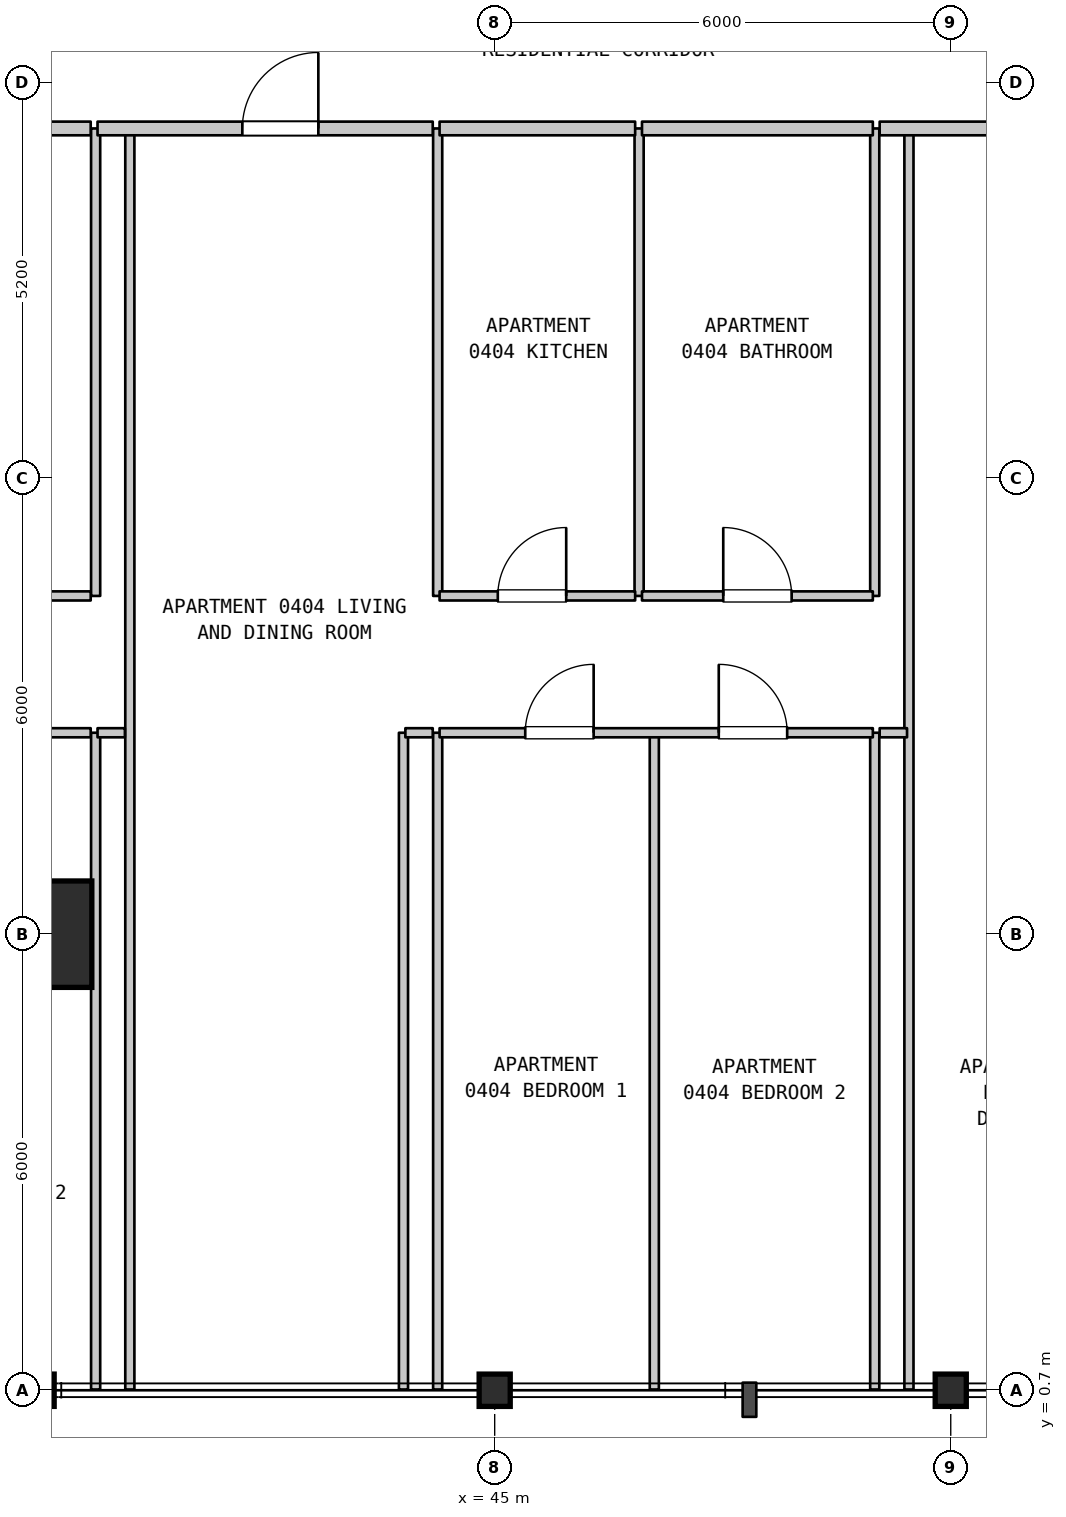
"""IFC4 building model, lengths in metres.
Left out: names, types, materials, properties, quantities, classifications, styles, units other than length and angle.
Written with IfcOpenShell. Run it as: python <this file> out.ifc"""

import sys

from ifc_helpers import new_model, si_unit, direction, frame, frame_2d, origin, origin_2d, place, context, subcontext, project, spatial, rectangle, i_section, extrude, element, fill, save


model = new_model("IFC4")
c1 = context("Model", 3, precision=1e-05, world=origin(), true_north=direction((0.0, 1.0)))
c2 = subcontext(c1, "Body", "Model", "MODEL_VIEW")
j1 = project(units=[si_unit("LENGTHUNIT", "METRE"), si_unit("PLANEANGLEUNIT", "RADIAN")], contexts=[c1])
p1 = place(None, origin())
s1 = spatial("IfcSite", under=j1, at=p1, CompositionType="ELEMENT")
p2 = place(p1, origin())
s2 = spatial("IfcBuilding", under=s1, at=p2, CompositionType="ELEMENT")
p3 = place(p2, frame((0.0, 0.0, 24.0)))
s3 = spatial("IfcBuildingStorey", under=s2, at=p3, CompositionType="ELEMENT", Elevation=24.0)
p4 = place(p3, frame((39.0, 0.7, 0.0), z_axis=(0.0, 0.0, 1.0), x_axis=(1.0, 0.0, 0.0)))
e1 = element("IfcColumn", 1, at=p4, inside=s3, PredefinedType="COLUMN", context=c2, shape_type="SweptSolid", body=[
    extrude(i_section(OverallWidth=0.409, OverallDepth=0.425, WebThickness=0.032, FlangeThickness=0.052, FilletRadius=0.015, at=origin_2d()), origin(), (0.0, 0.0, 1.0), 3.7),
])
p5 = place(p3, frame((39.0, 6.7, 0.0), z_axis=(0.0, 0.0, 1.0), x_axis=(1.0, 0.0, 0.0)))
e2 = element("IfcColumn", 2, at=p5, inside=s3, PredefinedType="COLUMN", context=c2, shape_type="SweptSolid", body=[
    extrude(rectangle(XDim=1.4, YDim=1.4, at=origin_2d()), origin(), (0.0, 0.0, 1.0), 3.7),
])
for number, where, z_axis, x_axis in (
    (3, (45.0, 0.7, 0.0), (0.0, 0.0, 1.0), (1.0, 0.0, 0.0)),
    (4, (51.0, 0.7, 0.0), (0.0, 0.0, 1.0), (1.0, 0.0, 0.0)),
):
    element("IfcColumn", number, at=place(p3, frame(where, z_axis=z_axis, x_axis=x_axis)), inside=s3, PredefinedType="COLUMN", context=c2, shape_type="SweptSolid", body=[
        extrude(i_section(OverallWidth=0.409, OverallDepth=0.425, WebThickness=0.032, FlangeThickness=0.052, FilletRadius=0.015, at=origin_2d()), origin(), (0.0, 0.0, 1.0), 3.7),
    ])
p6 = place(p3, frame((39.75, 0.71, 0.0), z_axis=(0.0, 0.0, 1.0), x_axis=(0.0, 1.0, 0.0)))
e5 = element("IfcWall", 5, at=p6, inside=s3, PredefinedType="PARTITIONING", context=c2, shape_type="SweptSolid", body=[
    extrude(rectangle(XDim=8.64, YDim=0.12, at=frame_2d((4.32, 0.0))), origin(), (0.0, 0.0, 1.0), 3.385),
])
p7 = place(p3, frame((39.75, 11.15, 0.0), z_axis=(0.0, 0.0, 1.0), x_axis=(0.0, 1.0, 0.0)))
e6 = element("IfcWall", 6, at=p7, inside=s3, PredefinedType="PARTITIONING", context=c2, shape_type="SweptSolid", body=[
    extrude(rectangle(XDim=6.15, YDim=0.12, at=frame_2d((3.075, 0.0))), origin(), (0.0, 0.0, 1.0), 3.385),
])
p8 = place(p3, frame((40.2, 0.71, 0.0), z_axis=(0.0, 0.0, 1.0), x_axis=(0.0, 1.0, 0.0)))
e7 = element("IfcWall", 7, at=p8, inside=s3, PredefinedType="PARTITIONING", context=c2, shape_type="SweptSolid", body=[
    extrude(rectangle(XDim=16.59, YDim=0.12, at=frame_2d((8.295, 0.0))), origin(), (0.0, 0.0, 1.0), 3.385),
])
for number, where, z_axis, x_axis in (
    (8, (43.8, 0.71, 0.0), (0.0, 0.0, 1.0), (0.0, 1.0, 0.0)),
    (9, (44.25, 0.71, 0.0), (0.0, 0.0, 1.0), (0.0, 1.0, 0.0)),
):
    element("IfcWall", number, at=place(p3, frame(where, z_axis=z_axis, x_axis=x_axis)), inside=s3, PredefinedType="PARTITIONING", context=c2, shape_type="SweptSolid", body=[
        extrude(rectangle(XDim=8.64, YDim=0.12, at=frame_2d((4.32, 0.0))), origin(), (0.0, 0.0, 1.0), 3.385),
    ])
for number, where, z_axis, x_axis in (
    (10, (44.25, 11.15, 0.0), (0.0, 0.0, 1.0), (0.0, 1.0, 0.0)),
    (11, (46.9, 11.15, 0.0), (0.0, 0.0, 1.0), (0.0, 1.0, 0.0)),
):
    element("IfcWall", number, at=place(p3, frame(where, z_axis=z_axis, x_axis=x_axis)), inside=s3, PredefinedType="PARTITIONING", context=c2, shape_type="SweptSolid", body=[
        extrude(rectangle(XDim=6.15, YDim=0.12, at=frame_2d((3.075, 0.0))), origin(), (0.0, 0.0, 1.0), 3.385),
    ])
for number, where, z_axis, x_axis in (
    (12, (47.1, 0.71, 0.0), (0.0, 0.0, 1.0), (0.0, 1.0, 0.0)),
    (13, (50.0, 0.71, 0.0), (0.0, 0.0, 1.0), (0.0, 1.0, 0.0)),
):
    element("IfcWall", number, at=place(p3, frame(where, z_axis=z_axis, x_axis=x_axis)), inside=s3, PredefinedType="PARTITIONING", context=c2, shape_type="SweptSolid", body=[
        extrude(rectangle(XDim=8.64, YDim=0.12, at=frame_2d((4.32, 0.0))), origin(), (0.0, 0.0, 1.0), 3.385),
    ])
p9 = place(p3, frame((50.0, 11.15, 0.0), z_axis=(0.0, 0.0, 1.0), x_axis=(0.0, 1.0, 0.0)))
e14 = element("IfcWall", 14, at=p9, inside=s3, PredefinedType="PARTITIONING", context=c2, shape_type="SweptSolid", body=[
    extrude(rectangle(XDim=6.15, YDim=0.12, at=frame_2d((3.075, 0.0))), origin(), (0.0, 0.0, 1.0), 3.385),
])
p10 = place(p3, frame((50.45, 0.71, 0.0), z_axis=(0.0, 0.0, 1.0), x_axis=(0.0, 1.0, 0.0)))
e15 = element("IfcWall", 15, at=p10, inside=s3, PredefinedType="PARTITIONING", context=c2, shape_type="SweptSolid", body=[
    extrude(rectangle(XDim=16.59, YDim=0.12, at=frame_2d((8.295, 0.0))), origin(), (0.0, 0.0, 1.0), 3.385),
])
p11 = place(p3, frame((33.985, 9.35, 0.0), z_axis=(0.0, 0.0, 1.0), x_axis=(1.0, 0.0, 0.0)))
e16 = element("IfcWall", 16, at=p11, inside=s3, PredefinedType="PARTITIONING", context=c2, shape_type="SweptSolid", body=[
    extrude(rectangle(XDim=5.7, YDim=0.12, at=frame_2d((2.85, 0.0))), origin(), (0.0, 0.0, 1.0), 3.385),
])
p12 = place(p11, frame((1.127, 0.0, 0.0)))
e17 = element("IfcOpeningElement", 17, at=p12, cuts=e16, PredefinedType="OPENING", context=c2, shape_type="SweptSolid", body=[
    extrude(rectangle(XDim=0.9, YDim=2.15, at=frame_2d((0.45, 1.075))), frame((0.0, 0.07, 0.0), z_axis=(0.0, -1.0, 0.0), x_axis=(1.0, 0.0, 0.0)), (0.0, 0.0, 1.0), 0.14),
])
p13 = place(p11, frame((3.673, 0.0, 0.0)))
e18 = element("IfcOpeningElement", 18, at=p13, cuts=e16, PredefinedType="OPENING", context=c2, shape_type="SweptSolid", body=[
    extrude(rectangle(XDim=0.9, YDim=2.15, at=frame_2d((0.45, 1.075))), frame((0.0, 0.07, 0.0), z_axis=(0.0, -1.0, 0.0), x_axis=(1.0, 0.0, 0.0)), (0.0, 0.0, 1.0), 0.14),
])
for number, where, z_axis, x_axis in (
    (19, (39.775, 9.35, 0.0), (0.0, 0.0, 1.0), (1.0, 0.0, 0.0)),
    (20, (43.825, 9.35, 0.0), (0.0, 0.0, 1.0), (1.0, 0.0, 0.0)),
):
    element("IfcWall", number, at=place(p3, frame(where, z_axis=z_axis, x_axis=x_axis)), inside=s3, PredefinedType="PARTITIONING", context=c2, shape_type="SweptSolid", body=[
        extrude(rectangle(XDim=0.36, YDim=0.12, at=frame_2d((0.18, 0.0))), origin(), (0.0, 0.0, 1.0), 3.385),
    ])
p14 = place(p3, frame((44.275, 9.35, 0.0), z_axis=(0.0, 0.0, 1.0), x_axis=(1.0, 0.0, 0.0)))
e21 = element("IfcWall", 21, at=p14, inside=s3, PredefinedType="PARTITIONING", context=c2, shape_type="SweptSolid", body=[
    extrude(rectangle(XDim=5.7, YDim=0.12, at=frame_2d((2.85, 0.0))), origin(), (0.0, 0.0, 1.0), 3.385),
])
p15 = place(p14, frame((1.127, 0.0, 0.0)))
e22 = element("IfcOpeningElement", 22, at=p15, cuts=e21, PredefinedType="OPENING", context=c2, shape_type="SweptSolid", body=[
    extrude(rectangle(XDim=0.9, YDim=2.15, at=frame_2d((0.45, 1.075))), frame((0.0, 0.07, 0.0), z_axis=(0.0, -1.0, 0.0), x_axis=(1.0, 0.0, 0.0)), (0.0, 0.0, 1.0), 0.14),
])
p16 = place(p14, frame((3.673, 0.0, 0.0)))
e23 = element("IfcOpeningElement", 23, at=p16, cuts=e21, PredefinedType="OPENING", context=c2, shape_type="SweptSolid", body=[
    extrude(rectangle(XDim=0.9, YDim=2.15, at=frame_2d((0.45, 1.075))), frame((0.0, 0.07, 0.0), z_axis=(0.0, -1.0, 0.0), x_axis=(1.0, 0.0, 0.0)), (0.0, 0.0, 1.0), 0.14),
])
p17 = place(p3, frame((50.065, 9.35, 0.0), z_axis=(0.0, 0.0, 1.0), x_axis=(1.0, 0.0, 0.0)))
e24 = element("IfcWall", 24, at=p17, inside=s3, PredefinedType="PARTITIONING", context=c2, shape_type="SweptSolid", body=[
    extrude(rectangle(XDim=0.36, YDim=0.12, at=frame_2d((0.18, 0.0))), origin(), (0.0, 0.0, 1.0), 3.385),
])
p18 = place(p3, frame((36.648, 11.15, 0.0), z_axis=(0.0, 0.0, 1.0), x_axis=(1.0, 0.0, 0.0)))
e25 = element("IfcWall", 25, at=p18, inside=s3, PredefinedType="PARTITIONING", context=c2, shape_type="SweptSolid", body=[
    extrude(rectangle(XDim=3.037, YDim=0.12, at=frame_2d((1.519, 0.0))), origin(), (0.0, 0.0, 1.0), 3.385),
])
p19 = place(p18, frame((1.068, 0.0, 0.0)))
e26 = element("IfcOpeningElement", 26, at=p19, cuts=e25, PredefinedType="OPENING", context=c2, shape_type="SweptSolid", body=[
    extrude(rectangle(XDim=0.9, YDim=2.1, at=frame_2d((0.45, 1.05))), frame((0.0, 0.07, 0.0), z_axis=(0.0, -1.0, 0.0), x_axis=(1.0, 0.0, 0.0)), (0.0, 0.0, 1.0), 0.14),
])
p20 = place(p3, frame((44.275, 11.15, 0.0), z_axis=(0.0, 0.0, 1.0), x_axis=(1.0, 0.0, 0.0)))
e27 = element("IfcWall", 27, at=p20, inside=s3, PredefinedType="PARTITIONING", context=c2, shape_type="SweptSolid", body=[
    extrude(rectangle(XDim=2.573, YDim=0.12, at=frame_2d((1.287, 0.0))), origin(), (0.0, 0.0, 1.0), 3.385),
])
p21 = place(p20, frame((0.766, 0.0, 0.0)))
e28 = element("IfcOpeningElement", 28, at=p21, cuts=e27, PredefinedType="OPENING", context=c2, shape_type="SweptSolid", body=[
    extrude(rectangle(XDim=0.9, YDim=2.15, at=frame_2d((0.45, 1.075))), frame((0.0, 0.07, 0.0), z_axis=(0.0, -1.0, 0.0), x_axis=(1.0, 0.0, 0.0)), (0.0, 0.0, 1.0), 0.14),
])
p22 = place(p3, frame((46.938, 11.15, 0.0), z_axis=(0.0, 0.0, 1.0), x_axis=(1.0, 0.0, 0.0)))
e29 = element("IfcWall", 29, at=p22, inside=s3, PredefinedType="PARTITIONING", context=c2, shape_type="SweptSolid", body=[
    extrude(rectangle(XDim=3.037, YDim=0.12, at=frame_2d((1.519, 0.0))), origin(), (0.0, 0.0, 1.0), 3.385),
])
p23 = place(p22, frame((1.069, 0.0, 0.0)))
e30 = element("IfcOpeningElement", 30, at=p23, cuts=e29, PredefinedType="OPENING", context=c2, shape_type="SweptSolid", body=[
    extrude(rectangle(XDim=0.9, YDim=2.1, at=frame_2d((0.45, 1.05))), frame((0.0, 0.07, 0.0), z_axis=(0.0, -1.0, 0.0), x_axis=(1.0, 0.0, 0.0)), (0.0, 0.0, 1.0), 0.14),
])
p24 = place(p3, frame((36.648, 17.3, 0.0), z_axis=(0.0, 0.0, 1.0), x_axis=(1.0, 0.0, 0.0)))
e31 = element("IfcWall", 31, at=p24, inside=s3, PredefinedType="STANDARD", context=c2, shape_type="SweptSolid", body=[
    extrude(rectangle(XDim=3.037, YDim=0.18, at=frame_2d((1.519, 0.0))), origin(), (0.0, 0.0, 1.0), 3.385),
])
p25 = place(p3, frame((39.775, 17.3, 0.0), z_axis=(0.0, 0.0, 1.0), x_axis=(1.0, 0.0, 0.0)))
e32 = element("IfcWall", 32, at=p25, inside=s3, PredefinedType="STANDARD", context=c2, shape_type="SweptSolid", body=[
    extrude(rectangle(XDim=4.41, YDim=0.18, at=frame_2d((2.205, 0.0))), origin(), (0.0, 0.0, 1.0), 3.385),
])
p26 = place(p25, frame((1.905, 0.0, 0.0)))
e33 = element("IfcOpeningElement", 33, at=p26, cuts=e32, PredefinedType="OPENING", context=c2, shape_type="SweptSolid", body=[
    extrude(rectangle(XDim=1.0, YDim=2.15, at=frame_2d((0.5, 1.075))), frame((0.0, 0.1, 0.0), z_axis=(0.0, -1.0, 0.0), x_axis=(1.0, 0.0, 0.0)), (0.0, 0.0, 1.0), 0.2),
])
p27 = place(p3, frame((44.275, 17.3, 0.0), z_axis=(0.0, 0.0, 1.0), x_axis=(1.0, 0.0, 0.0)))
e34 = element("IfcWall", 34, at=p27, inside=s3, PredefinedType="STANDARD", context=c2, shape_type="SweptSolid", body=[
    extrude(rectangle(XDim=2.573, YDim=0.18, at=frame_2d((1.287, 0.0))), origin(), (0.0, 0.0, 1.0), 3.385),
])
p28 = place(p3, frame((46.938, 17.3, 0.0), z_axis=(0.0, 0.0, 1.0), x_axis=(1.0, 0.0, 0.0)))
e35 = element("IfcWall", 35, at=p28, inside=s3, PredefinedType="STANDARD", context=c2, shape_type="SweptSolid", body=[
    extrude(rectangle(XDim=3.037, YDim=0.18, at=frame_2d((1.519, 0.0))), origin(), (0.0, 0.0, 1.0), 3.385),
])
p29 = place(p3, frame((50.065, 17.3, 0.0), z_axis=(0.0, 0.0, 1.0), x_axis=(1.0, 0.0, 0.0)))
e36 = element("IfcWall", 36, at=p29, inside=s3, PredefinedType="STANDARD", context=c2, shape_type="SweptSolid", body=[
    extrude(rectangle(XDim=3.96, YDim=0.18, at=frame_2d((1.98, 0.0))), origin(), (0.0, 0.0, 1.0), 3.385),
])
p30 = place(p29, frame((1.609, 0.0, 0.0)))
e37 = element("IfcOpeningElement", 37, at=p30, cuts=e36, PredefinedType="OPENING", context=c2, shape_type="SweptSolid", body=[
    extrude(rectangle(XDim=1.0, YDim=2.15, at=frame_2d((0.5, 1.075))), frame((0.0, 0.1, 0.0), z_axis=(0.0, -1.0, 0.0), x_axis=(1.0, 0.0, 0.0)), (0.0, 0.0, 1.0), 0.2),
])
p31 = place(p15, origin())
e38 = element("IfcDoor", 38, at=p31, inside=s3, OperationType="SINGLE_SWING_RIGHT", PredefinedType="DOOR", context=c2, shape_type="SweptSolid", body=[
    extrude(rectangle(XDim=0.9, YDim=2.15, at=frame_2d((0.45, 1.075))), frame((0.0, 0.025, 0.0), z_axis=(0.0, -1.0, 0.0), x_axis=(1.0, 0.0, 0.0)), (0.0, 0.0, 1.0), 0.05),
])
fill(e22, e38)
p32 = place(p16, origin())
e39 = element("IfcDoor", 39, at=p32, inside=s3, OperationType="SINGLE_SWING_LEFT", PredefinedType="DOOR", context=c2, shape_type="SweptSolid", body=[
    extrude(rectangle(XDim=0.9, YDim=2.15, at=frame_2d((0.45, 1.075))), frame((0.0, 0.025, 0.0), z_axis=(0.0, -1.0, 0.0), x_axis=(1.0, 0.0, 0.0)), (0.0, 0.0, 1.0), 0.05),
])
fill(e23, e39)
p33 = place(p21, origin())
e40 = element("IfcDoor", 40, at=p33, inside=s3, OperationType="SINGLE_SWING_RIGHT", PredefinedType="DOOR", context=c2, shape_type="SweptSolid", body=[
    extrude(rectangle(XDim=0.9, YDim=2.15, at=frame_2d((0.45, 1.075))), frame((0.0, 0.025, 0.0), z_axis=(0.0, -1.0, 0.0), x_axis=(1.0, 0.0, 0.0)), (0.0, 0.0, 1.0), 0.05),
])
fill(e28, e40)
p34 = place(p23, origin())
e41 = element("IfcDoor", 41, at=p34, inside=s3, OperationType="SINGLE_SWING_LEFT", PredefinedType="DOOR", context=c2, shape_type="SweptSolid", body=[
    extrude(rectangle(XDim=0.9, YDim=2.1, at=frame_2d((0.45, 1.05))), frame((0.0, 0.025, 0.0), z_axis=(0.0, -1.0, 0.0), x_axis=(1.0, 0.0, 0.0)), (0.0, 0.0, 1.0), 0.05),
])
fill(e30, e41)
p35 = place(p26, origin())
e42 = element("IfcDoor", 42, at=p35, inside=s3, OperationType="SINGLE_SWING_RIGHT", PredefinedType="DOOR", context=c2, shape_type="SweptSolid", body=[
    extrude(rectangle(XDim=1.0, YDim=2.15, at=frame_2d((0.5, 1.075))), frame((0.0, 0.025, 0.0), z_axis=(0.0, -1.0, 0.0), x_axis=(1.0, 0.0, 0.0)), (0.0, 0.0, 1.0), 0.05),
])
fill(e33, e42)
save(model, sys.argv[1])
